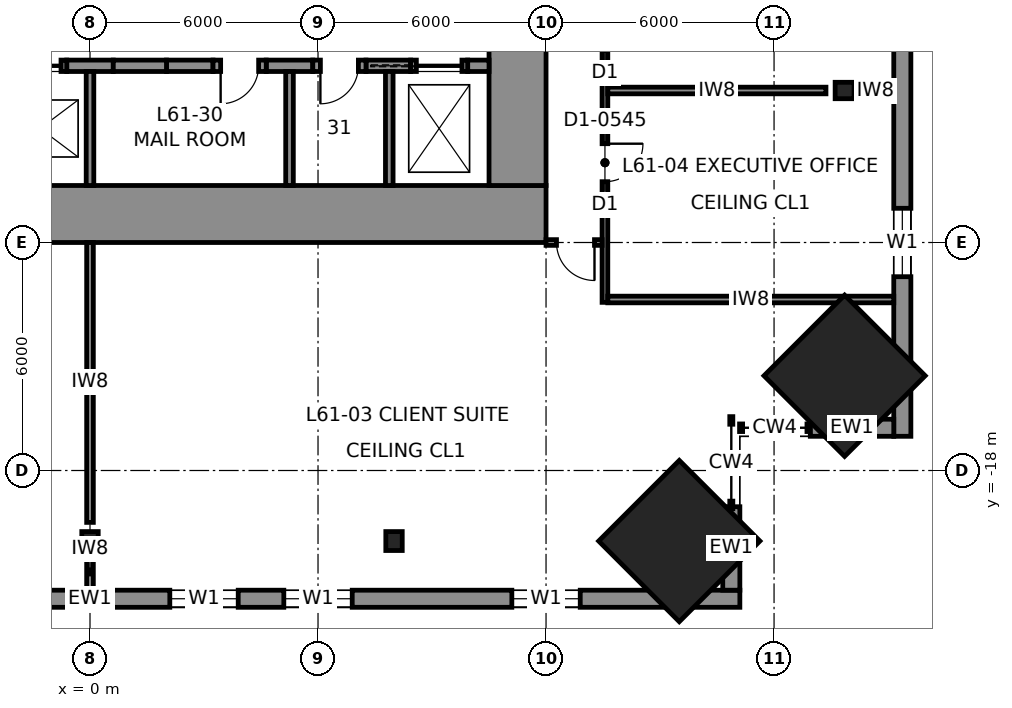
"""IFC4 building model, lengths in metres.
Left out: names, types, materials, properties, quantities, classifications, styles, units other than length and angle.
Written with IfcOpenShell. Run it as: python <this file> out.ifc"""

import sys

from ifc_helpers import new_model, si_unit, direction, frame, frame_2d, origin, origin_2d, place, context, subcontext, project, spatial, rectangle, i_section, extrude, element, fill, save


model = new_model("IFC4")
c1 = context("Model", 3, precision=1e-05, world=origin(), true_north=direction((0.0, 1.0)))
c2 = subcontext(c1, "Body", "Model", "MODEL_VIEW")
j1 = project(units=[si_unit("LENGTHUNIT", "METRE"), si_unit("PLANEANGLEUNIT", "RADIAN")], contexts=[c1])
p1 = place(None, origin())
s1 = spatial("IfcSite", under=j1, at=p1, CompositionType="ELEMENT")
p2 = place(p1, origin())
s2 = spatial("IfcBuilding", under=s1, at=p2, CompositionType="ELEMENT")
p3 = place(p2, frame((0.0, 0.0, 273.8)))
s3 = spatial("IfcBuildingStorey", under=s2, at=p3, CompositionType="ELEMENT", Elevation=273.8)
for number, where, z_axis, x_axis in (
    (1, (19.856, -15.506, 0.0), (-0.04, 0.04, 0.998), (-0.707, -0.708, 0.0)),
    (2, (15.506, -19.856, 0.0), (-0.04, 0.04, 0.998), (-0.708, -0.707, 0.0)),
):
    element("IfcColumn", number, at=place(p3, frame(where, z_axis=z_axis, x_axis=x_axis)), inside=s3, PredefinedType="COLUMN", context=c2, shape_type="SweptSolid", body=[
        extrude(rectangle(XDim=3.0, YDim=3.0, at=origin_2d()), origin(), (0.0, 0.0, 1.0), 4.007),
    ])
for number, where, z_axis, x_axis in (
    (3, (19.856, -8.0, 0.0), (-0.04, 0.0, 0.999), (0.0, -1.0, 0.0)),
    (4, (0.0, -19.856, 0.0), (0.0, 0.04, 0.999), (-1.0, 0.0, 0.0)),
    (5, (8.0, -19.856, 0.0), (0.0, 0.04, 0.999), (-1.0, 0.0, 0.0)),
):
    element("IfcColumn", number, at=place(p3, frame(where, z_axis=z_axis, x_axis=x_axis)), inside=s3, PredefinedType="COLUMN", context=c2, shape_type="SweptSolid", body=[
        extrude(i_section(OverallWidth=0.432, OverallDepth=0.498, WebThickness=0.056, FlangeThickness=0.089, at=origin_2d()), origin(), (0.0, 0.0, 1.0), 4.003),
    ])
p4 = place(p3, frame((12.0, -11.25, 0.0), z_axis=(0.0, 0.0, 1.0), x_axis=(-1.0, 0.0, 0.0)))
e6 = element("IfcWall", 6, at=p4, inside=s3, PredefinedType="SHEAR", context=c2, shape_type="SweptSolid", body=[
    extrude(rectangle(XDim=24.0, YDim=1.5, at=frame_2d((12.0, 0.0))), origin(), (0.0, 0.0, 1.0), 4.0),
])
p5 = place(p3, frame((11.25, 10.5, 0.0), z_axis=(0.0, 0.0, 1.0), x_axis=(0.0, -1.0, 0.0)))
e7 = element("IfcWall", 7, at=p5, inside=s3, PredefinedType="SHEAR", context=c2, shape_type="SweptSolid", body=[
    extrude(rectangle(XDim=21.0, YDim=1.5, at=frame_2d((10.5, 0.0))), origin(), (0.0, 0.0, 1.0), 4.0),
])
p6 = place(p5, frame((3.7, 0.0, 0.0)))
e8 = element("IfcOpeningElement", 8, at=p6, cuts=e7, PredefinedType="OPENING", context=c2, shape_type="SweptSolid", body=[
    extrude(rectangle(XDim=1.2, YDim=2.3, at=frame_2d((0.6, 1.15))), frame((0.0, 0.76, 0.0), z_axis=(0.0, -1.0, 0.0), x_axis=(1.0, 0.0, 0.0)), (0.0, 0.0, 1.0), 1.52),
])
p7 = place(p5, frame((16.1, 0.0, 0.0)))
e9 = element("IfcOpeningElement", 9, at=p7, cuts=e7, PredefinedType="OPENING", context=c2, shape_type="SweptSolid", body=[
    extrude(rectangle(XDim=1.2, YDim=2.3, at=frame_2d((0.6, 1.15))), frame((0.0, 0.76, 0.0), z_axis=(0.0, -1.0, 0.0), x_axis=(1.0, 0.0, 0.0)), (0.0, 0.0, 1.0), 1.52),
])
for number, where, z_axis, x_axis in (
    (10, (-0.613, -7.35, 0.0), (0.0, 0.0, 1.0), (1.0, 0.0, 0.0)),
    (11, (2.012, -7.35, 0.0), (0.0, 0.0, 1.0), (1.0, 0.0, 0.0)),
    (12, (4.637, -7.35, 0.0), (0.0, 0.0, 1.0), (1.0, 0.0, 0.0)),
):
    element("IfcWall", number, at=place(p3, frame(where, z_axis=z_axis, x_axis=x_axis)), inside=s3, PredefinedType="SHEAR", context=c2, shape_type="SweptSolid", body=[
        extrude(rectangle(XDim=1.225, YDim=0.3, at=frame_2d((0.613, 0.0))), origin(), (0.0, 0.0, 1.0), 4.0),
    ])
p8 = place(p3, frame((7.262, -7.35, 0.0), z_axis=(0.0, 0.0, 1.0), x_axis=(1.0, 0.0, 0.0)))
e13 = element("IfcWall", 13, at=p8, inside=s3, PredefinedType="SHEAR", context=c2, shape_type="SweptSolid", body=[
    extrude(rectangle(XDim=1.175, YDim=0.3, at=frame_2d((0.587, 0.0))), origin(), (0.0, 0.0, 1.0), 4.0),
])
p9 = place(p3, frame((9.938, -7.35, 0.0), z_axis=(0.0, 0.0, 1.0), x_axis=(1.0, 0.0, 0.0)))
e14 = element("IfcWall", 14, at=p9, inside=s3, PredefinedType="SHEAR", context=c2, shape_type="SweptSolid", body=[
    extrude(rectangle(XDim=0.562, YDim=0.3, at=frame_2d((0.281, 0.0))), origin(), (0.0, 0.0, 1.0), 4.0),
])
p10 = place(p3, frame((-2.012, -7.35, 0.0), z_axis=(0.0, 0.0, 1.0), x_axis=(1.0, 0.0, 0.0)))
e15 = element("IfcWall", 15, at=p10, inside=s3, PredefinedType="PARTITIONING", context=c2, shape_type="SweptSolid", body=[
    extrude(rectangle(XDim=1.4, YDim=0.3, at=frame_2d((0.7, 0.0))), origin(), (0.0, 0.0, 1.0), 4.0),
])
p11 = place(p10, frame((0.15, 0.0, 0.0)))
e16 = element("IfcOpeningElement", 16, at=p11, cuts=e15, PredefinedType="OPENING", context=c2, shape_type="SweptSolid", body=[
    extrude(rectangle(XDim=1.1, YDim=2.3, at=frame_2d((0.55, 1.15))), frame((0.0, 0.16, 0.0), z_axis=(0.0, -1.0, 0.0), x_axis=(1.0, 0.0, 0.0)), (0.0, 0.0, 1.0), 0.32),
])
p12 = place(p3, frame((0.613, -7.35, 0.0), z_axis=(0.0, 0.0, 1.0), x_axis=(1.0, 0.0, 0.0)))
e17 = element("IfcWall", 17, at=p12, inside=s3, PredefinedType="PARTITIONING", context=c2, shape_type="SweptSolid", body=[
    extrude(rectangle(XDim=1.4, YDim=0.3, at=frame_2d((0.7, 0.0))), origin(), (0.0, 0.0, 1.0), 4.0),
])
p13 = place(p3, frame((3.238, -7.35, 0.0), z_axis=(0.0, 0.0, 1.0), x_axis=(1.0, 0.0, 0.0)))
e18 = element("IfcWall", 18, at=p13, inside=s3, PredefinedType="PARTITIONING", context=c2, shape_type="SweptSolid", body=[
    extrude(rectangle(XDim=1.4, YDim=0.3, at=frame_2d((0.7, 0.0))), origin(), (0.0, 0.0, 1.0), 4.0),
])
p14 = place(p13, frame((0.2, 0.0, 0.0)))
e19 = element("IfcOpeningElement", 19, at=p14, cuts=e18, PredefinedType="OPENING", context=c2, shape_type="SweptSolid", body=[
    extrude(rectangle(XDim=1.0, YDim=2.3, at=frame_2d((0.5, 1.15))), frame((0.0, 0.16, 0.0), z_axis=(0.0, -1.0, 0.0), x_axis=(1.0, 0.0, 0.0)), (0.0, 0.0, 1.0), 0.32),
])
p15 = place(p3, frame((5.863, -7.35, 0.0), z_axis=(0.0, 0.0, 1.0), x_axis=(1.0, 0.0, 0.0)))
e20 = element("IfcWall", 20, at=p15, inside=s3, PredefinedType="PARTITIONING", context=c2, shape_type="SweptSolid", body=[
    extrude(rectangle(XDim=1.4, YDim=0.3, at=frame_2d((0.7, 0.0))), origin(), (0.0, 0.0, 1.0), 4.0),
])
p16 = place(p15, frame((0.2, 0.0, 0.0)))
e21 = element("IfcOpeningElement", 21, at=p16, cuts=e20, PredefinedType="OPENING", context=c2, shape_type="SweptSolid", body=[
    extrude(rectangle(XDim=1.0, YDim=2.3, at=frame_2d((0.5, 1.15))), frame((0.0, 0.16, 0.0), z_axis=(0.0, -1.0, 0.0), x_axis=(1.0, 0.0, 0.0)), (0.0, 0.0, 1.0), 0.32),
])
p17 = place(p3, frame((8.438, -7.35, 0.0), z_axis=(0.0, 0.0, 1.0), x_axis=(1.0, 0.0, 0.0)))
e22 = element("IfcWall", 22, at=p17, inside=s3, PredefinedType="PARTITIONING", context=c2, shape_type="SweptSolid", body=[
    extrude(rectangle(XDim=1.5, YDim=0.3, at=frame_2d((0.75, 0.0))), origin(), (0.0, 0.0, 1.0), 4.0),
])
p18 = place(p17, frame((0.15, 0.0, 0.0)))
e23 = element("IfcOpeningElement", 23, at=p18, cuts=e22, PredefinedType="OPENING", context=c2, shape_type="SweptSolid", body=[
    extrude(rectangle(XDim=1.2, YDim=2.3, at=frame_2d((0.6, 1.15))), frame((0.0, 0.16, 0.0), z_axis=(0.0, -1.0, 0.0), x_axis=(1.0, 0.0, 0.0)), (0.0, 0.0, 1.0), 0.32),
])
for number, where, z_axis, x_axis in (
    (24, (0.0, -10.5, 0.0), (0.0, 0.0, 1.0), (0.0, 1.0, 0.0)),
    (25, (5.25, -10.5, 0.0), (0.0, 0.0, 1.0), (0.0, 1.0, 0.0)),
    (26, (7.875, -10.5, 0.0), (0.0, 0.0, 1.0), (0.0, 1.0, 0.0)),
):
    element("IfcWall", number, at=place(p3, frame(where, z_axis=z_axis, x_axis=x_axis)), inside=s3, PredefinedType="PARTITIONING", context=c2, shape_type="SweptSolid", body=[
        extrude(rectangle(XDim=3.0, YDim=0.2, at=frame_2d((1.5, 0.0))), origin(), (0.0, 0.0, 1.0), 4.0),
    ])
p19 = place(p3, frame((21.375, -17.1, 0.0), z_axis=(0.0, 0.0, 1.0), x_axis=(0.0, 1.0, 0.0)))
e27 = element("IfcWall", 27, at=p19, inside=s3, PredefinedType="SOLIDWALL", context=c2, shape_type="SweptSolid", body=[
    extrude(rectangle(XDim=34.2, YDim=0.45, at=frame_2d((17.1, 0.0))), origin(), (0.0, 0.0, 1.0), 3.83),
])
p20 = place(p19, frame((4.2, 0.0, 0.7)))
e28 = element("IfcOpeningElement", 28, at=p20, cuts=e27, PredefinedType="OPENING", context=c2, shape_type="SweptSolid", body=[
    extrude(rectangle(XDim=1.8, YDim=2.6, at=frame_2d((0.9, 1.3))), frame((0.0, 0.235, 0.0), z_axis=(0.0, -1.0, 0.0), x_axis=(1.0, 0.0, 0.0)), (0.0, 0.0, 1.0), 0.47),
])
p21 = place(p19, frame((10.2, 0.0, 0.7)))
e29 = element("IfcOpeningElement", 29, at=p21, cuts=e27, PredefinedType="OPENING", context=c2, shape_type="SweptSolid", body=[
    extrude(rectangle(XDim=1.8, YDim=2.6, at=frame_2d((0.9, 1.3))), frame((0.0, 0.235, 0.0), z_axis=(0.0, -1.0, 0.0), x_axis=(1.0, 0.0, 0.0)), (0.0, 0.0, 1.0), 0.47),
])
p22 = place(p19, frame((13.2, 0.0, 0.7)))
e30 = element("IfcOpeningElement", 30, at=p22, cuts=e27, PredefinedType="OPENING", context=c2, shape_type="SweptSolid", body=[
    extrude(rectangle(XDim=1.8, YDim=2.6, at=frame_2d((0.9, 1.3))), frame((0.0, 0.235, 0.0), z_axis=(0.0, -1.0, 0.0), x_axis=(1.0, 0.0, 0.0)), (0.0, 0.0, 1.0), 0.47),
])
p23 = place(p19, frame((19.2, 0.0, 0.7)))
e31 = element("IfcOpeningElement", 31, at=p23, cuts=e27, PredefinedType="OPENING", context=c2, shape_type="SweptSolid", body=[
    extrude(rectangle(XDim=1.8, YDim=2.6, at=frame_2d((0.9, 1.3))), frame((0.0, 0.235, 0.0), z_axis=(0.0, -1.0, 0.0), x_axis=(1.0, 0.0, 0.0)), (0.0, 0.0, 1.0), 0.47),
])
p24 = place(p19, frame((22.2, 0.0, 0.7)))
e32 = element("IfcOpeningElement", 32, at=p24, cuts=e27, PredefinedType="OPENING", context=c2, shape_type="SweptSolid", body=[
    extrude(rectangle(XDim=1.8, YDim=2.6, at=frame_2d((0.9, 1.3))), frame((0.0, 0.235, 0.0), z_axis=(0.0, -1.0, 0.0), x_axis=(1.0, 0.0, 0.0)), (0.0, 0.0, 1.0), 0.47),
])
p25 = place(p19, frame((28.2, 0.0, 0.7)))
e33 = element("IfcOpeningElement", 33, at=p25, cuts=e27, PredefinedType="OPENING", context=c2, shape_type="SweptSolid", body=[
    extrude(rectangle(XDim=1.8, YDim=2.6, at=frame_2d((0.9, 1.3))), frame((0.0, 0.235, 0.0), z_axis=(0.0, -1.0, 0.0), x_axis=(1.0, 0.0, 0.0)), (0.0, 0.0, 1.0), 0.47),
])
p26 = place(p3, frame((-17.1, -21.375, 0.0), z_axis=(0.0, 0.0, 1.0), x_axis=(1.0, 0.0, 0.0)))
e34 = element("IfcWall", 34, at=p26, inside=s3, PredefinedType="SOLIDWALL", context=c2, shape_type="SweptSolid", body=[
    extrude(rectangle(XDim=34.2, YDim=0.45, at=frame_2d((17.1, 0.0))), origin(), (0.0, 0.0, 1.0), 3.83),
])
p27 = place(p26, frame((4.2, 0.0, 0.7)))
e35 = element("IfcOpeningElement", 35, at=p27, cuts=e34, PredefinedType="OPENING", context=c2, shape_type="SweptSolid", body=[
    extrude(rectangle(XDim=1.8, YDim=2.6, at=frame_2d((0.9, 1.3))), frame((0.0, 0.235, 0.0), z_axis=(0.0, -1.0, 0.0), x_axis=(1.0, 0.0, 0.0)), (0.0, 0.0, 1.0), 0.47),
])
p28 = place(p26, frame((10.2, 0.0, 0.7)))
e36 = element("IfcOpeningElement", 36, at=p28, cuts=e34, PredefinedType="OPENING", context=c2, shape_type="SweptSolid", body=[
    extrude(rectangle(XDim=1.8, YDim=2.6, at=frame_2d((0.9, 1.3))), frame((0.0, 0.235, 0.0), z_axis=(0.0, -1.0, 0.0), x_axis=(1.0, 0.0, 0.0)), (0.0, 0.0, 1.0), 0.47),
])
p29 = place(p26, frame((13.2, 0.0, 0.7)))
e37 = element("IfcOpeningElement", 37, at=p29, cuts=e34, PredefinedType="OPENING", context=c2, shape_type="SweptSolid", body=[
    extrude(rectangle(XDim=1.8, YDim=2.6, at=frame_2d((0.9, 1.3))), frame((0.0, 0.235, 0.0), z_axis=(0.0, -1.0, 0.0), x_axis=(1.0, 0.0, 0.0)), (0.0, 0.0, 1.0), 0.47),
])
p30 = place(p26, frame((19.2, 0.0, 0.7)))
e38 = element("IfcOpeningElement", 38, at=p30, cuts=e34, PredefinedType="OPENING", context=c2, shape_type="SweptSolid", body=[
    extrude(rectangle(XDim=1.8, YDim=2.6, at=frame_2d((0.9, 1.3))), frame((0.0, 0.235, 0.0), z_axis=(0.0, -1.0, 0.0), x_axis=(1.0, 0.0, 0.0)), (0.0, 0.0, 1.0), 0.47),
])
p31 = place(p26, frame((22.2, 0.0, 0.7)))
e39 = element("IfcOpeningElement", 39, at=p31, cuts=e34, PredefinedType="OPENING", context=c2, shape_type="SweptSolid", body=[
    extrude(rectangle(XDim=1.8, YDim=2.6, at=frame_2d((0.9, 1.3))), frame((0.0, 0.235, 0.0), z_axis=(0.0, -1.0, 0.0), x_axis=(1.0, 0.0, 0.0)), (0.0, 0.0, 1.0), 0.47),
])
p32 = place(p26, frame((28.2, 0.0, 0.7)))
e40 = element("IfcOpeningElement", 40, at=p32, cuts=e34, PredefinedType="OPENING", context=c2, shape_type="SweptSolid", body=[
    extrude(rectangle(XDim=1.8, YDim=2.6, at=frame_2d((0.9, 1.3))), frame((0.0, 0.235, 0.0), z_axis=(0.0, -1.0, 0.0), x_axis=(1.0, 0.0, 0.0)), (0.0, 0.0, 1.0), 0.47),
])
for number, where, z_axis, x_axis in (
    (41, (16.875, -18.954, 0.0), (0.0, 0.0, 1.0), (0.0, -1.0, 0.0)),
    (42, (18.954, -16.875, 0.0), (0.0, 0.0, 1.0), (1.0, 0.0, 0.0)),
):
    element("IfcWall", number, at=place(p3, frame(where, z_axis=z_axis, x_axis=x_axis)), inside=s3, PredefinedType="SOLIDWALL", context=c2, shape_type="SweptSolid", body=[
        extrude(rectangle(XDim=2.196, YDim=0.45, at=frame_2d((1.098, 0.0))), origin(), (0.0, 0.0, 1.0), 3.83),
    ])
p33 = place(p3, frame((13.55, -13.575, 0.0), z_axis=(0.0, 0.0, 1.0), x_axis=(0.0, 1.0, 0.0)))
e43 = element("IfcWall", 43, at=p33, inside=s3, PredefinedType="PARTITIONING", context=c2, shape_type="SweptSolid", body=[
    extrude(rectangle(XDim=27.15, YDim=0.15, at=frame_2d((13.575, 0.0))), origin(), (0.0, 0.0, 1.0), 3.83),
])
p34 = place(p33, frame((3.175, 0.0, 0.0)))
e44 = element("IfcOpeningElement", 44, at=p34, cuts=e43, PredefinedType="OPENING", context=c2, shape_type="SweptSolid", body=[
    extrude(rectangle(XDim=1.0, YDim=2.3, at=frame_2d((0.5, 1.15))), frame((0.0, 0.085, 0.0), z_axis=(0.0, -1.0, 0.0), x_axis=(1.0, 0.0, 0.0)), (0.0, 0.0, 1.0), 0.17),
])
p35 = place(p33, frame((6.625, 0.0, 0.0)))
e45 = element("IfcOpeningElement", 45, at=p35, cuts=e43, PredefinedType="OPENING", context=c2, shape_type="SweptSolid", body=[
    extrude(rectangle(XDim=1.0, YDim=2.3, at=frame_2d((0.5, 1.15))), frame((0.0, 0.085, 0.0), z_axis=(0.0, -1.0, 0.0), x_axis=(1.0, 0.0, 0.0)), (0.0, 0.0, 1.0), 0.17),
])
p36 = place(p33, frame((17.075, 0.0, 0.0)))
e46 = element("IfcOpeningElement", 46, at=p36, cuts=e43, PredefinedType="OPENING", context=c2, shape_type="SweptSolid", body=[
    extrude(rectangle(XDim=1.0, YDim=2.3, at=frame_2d((0.5, 1.15))), frame((0.0, 0.085, 0.0), z_axis=(0.0, -1.0, 0.0), x_axis=(1.0, 0.0, 0.0)), (0.0, 0.0, 1.0), 0.17),
])
p37 = place(p33, frame((22.975, 0.0, 0.0)))
e47 = element("IfcOpeningElement", 47, at=p37, cuts=e43, PredefinedType="OPENING", context=c2, shape_type="SweptSolid", body=[
    extrude(rectangle(XDim=1.0, YDim=2.3, at=frame_2d((0.5, 1.15))), frame((0.0, 0.085, 0.0), z_axis=(0.0, -1.0, 0.0), x_axis=(1.0, 0.0, 0.0)), (0.0, 0.0, 1.0), 0.17),
])
p38 = place(p33, frame((9.825, 0.0, 0.0)))
e48 = element("IfcOpeningElement", 48, at=p38, cuts=e43, PredefinedType="OPENING", context=c2, shape_type="SweptSolid", body=[
    extrude(rectangle(XDim=1.0, YDim=2.3, at=frame_2d((0.5, 1.15))), frame((0.0, 0.085, 0.0), z_axis=(0.0, -1.0, 0.0), x_axis=(1.0, 0.0, 0.0)), (0.0, 0.0, 1.0), 0.17),
])
p39 = place(p3, frame((13.475, -12.0, 0.0), z_axis=(0.0, 0.0, 1.0), x_axis=(-1.0, 0.0, 0.0)))
e49 = element("IfcWall", 49, at=p39, inside=s3, PredefinedType="PARTITIONING", context=c2, shape_type="SweptSolid", body=[
    extrude(rectangle(XDim=1.475, YDim=0.15, at=frame_2d((0.738, 0.0))), origin(), (0.0, 0.0, 1.0), 3.83),
])
p40 = place(p39, frame((0.2, 0.0, 0.0)))
e50 = element("IfcOpeningElement", 50, at=p40, cuts=e49, PredefinedType="OPENING", context=c2, shape_type="SweptSolid", body=[
    extrude(rectangle(XDim=1.0, YDim=2.3, at=frame_2d((0.5, 1.15))), frame((0.0, 0.085, 0.0), z_axis=(0.0, -1.0, 0.0), x_axis=(1.0, 0.0, 0.0)), (0.0, 0.0, 1.0), 0.17),
])
p41 = place(p3, frame((21.15, -13.5, 0.0), z_axis=(0.0, 0.0, 1.0), x_axis=(-1.0, 0.0, 0.0)))
e51 = element("IfcWall", 51, at=p41, inside=s3, PredefinedType="PARTITIONING", context=c2, shape_type="SweptSolid", body=[
    extrude(rectangle(XDim=7.525, YDim=0.175, at=frame_2d((3.762, 0.0))), origin(), (0.0, 0.0, 1.0), 3.83),
])
p42 = place(p3, frame((0.0, -12.0, 0.0), z_axis=(0.0, 0.0, 1.0), x_axis=(0.0, -1.0, 0.0)))
e52 = element("IfcWall", 52, at=p42, inside=s3, PredefinedType="PARTITIONING", context=c2, shape_type="SweptSolid", body=[
    extrude(rectangle(XDim=7.365, YDim=0.175, at=frame_2d((3.683, 0.0))), origin(), (0.0, 0.0, 1.0), 3.24),
])
p43 = place(p3, frame((0.0, -20.186, 0.0), z_axis=(0.0, 0.0, 1.0), x_axis=(0.0, -1.0, 0.0)))
e53 = element("IfcWall", 53, at=p43, inside=s3, PredefinedType="PARTITIONING", context=c2, shape_type="SweptSolid", body=[
    extrude(rectangle(XDim=0.964, YDim=0.175, at=frame_2d((0.482, 0.0))), origin(), (0.0, 0.0, 1.0), 3.83),
])
p44 = place(p3, frame((13.625, -8.0, 0.0), z_axis=(0.0, 0.0, 1.0), x_axis=(1.0, 0.0, 0.0)))
e54 = element("IfcWall", 54, at=p44, inside=s3, PredefinedType="PARTITIONING", context=c2, shape_type="SweptSolid", body=[
    extrude(rectangle(XDim=5.74, YDim=0.175, at=frame_2d((2.87, 0.0))), origin(), (0.0, 0.0, 1.0), 3.24),
])
p45 = place(p3, frame((20.186, -8.0, 0.0), z_axis=(0.0, 0.0, 1.0), x_axis=(1.0, 0.0, 0.0)))
e55 = element("IfcWall", 55, at=p45, inside=s3, PredefinedType="PARTITIONING", context=c2, shape_type="SweptSolid", body=[
    extrude(rectangle(XDim=0.964, YDim=0.175, at=frame_2d((0.482, 0.0))), origin(), (0.0, 0.0, 1.0), 3.83),
])
p46 = place(p20, origin())
e56 = element("IfcWindow", 56, at=p46, inside=s3, PartitioningType="SINGLE_PANEL", PredefinedType="WINDOW", context=c2, shape_type="SweptSolid", body=[
    extrude(rectangle(XDim=1.8, YDim=2.6, at=frame_2d((0.9, 1.3))), frame((0.0, 0.03, 0.0), z_axis=(0.0, -1.0, 0.0), x_axis=(1.0, 0.0, 0.0)), (0.0, 0.0, 1.0), 0.06),
])
fill(e28, e56)
p47 = place(p30, origin())
e57 = element("IfcWindow", 57, at=p47, inside=s3, PartitioningType="SINGLE_PANEL", PredefinedType="WINDOW", context=c2, shape_type="SweptSolid", body=[
    extrude(rectangle(XDim=1.8, YDim=2.6, at=frame_2d((0.9, 1.3))), frame((0.0, 0.03, 0.0), z_axis=(0.0, -1.0, 0.0), x_axis=(1.0, 0.0, 0.0)), (0.0, 0.0, 1.0), 0.06),
])
fill(e38, e57)
p48 = place(p31, origin())
e58 = element("IfcWindow", 58, at=p48, inside=s3, PartitioningType="SINGLE_PANEL", PredefinedType="WINDOW", context=c2, shape_type="SweptSolid", body=[
    extrude(rectangle(XDim=1.8, YDim=2.6, at=frame_2d((0.9, 1.3))), frame((0.0, 0.03, 0.0), z_axis=(0.0, -1.0, 0.0), x_axis=(1.0, 0.0, 0.0)), (0.0, 0.0, 1.0), 0.06),
])
fill(e39, e58)
p49 = place(p32, origin())
e59 = element("IfcWindow", 59, at=p49, inside=s3, PartitioningType="SINGLE_PANEL", PredefinedType="WINDOW", context=c2, shape_type="SweptSolid", body=[
    extrude(rectangle(XDim=1.8, YDim=2.6, at=frame_2d((0.9, 1.3))), frame((0.0, 0.03, 0.0), z_axis=(0.0, -1.0, 0.0), x_axis=(1.0, 0.0, 0.0)), (0.0, 0.0, 1.0), 0.06),
])
fill(e40, e59)
p50 = place(p40, origin())
e60 = element("IfcDoor", 60, at=p50, inside=s3, OperationType="SINGLE_SWING_LEFT", PredefinedType="DOOR", context=c2, shape_type="SweptSolid", body=[
    extrude(rectangle(XDim=1.0, YDim=2.3, at=frame_2d((0.5, 1.15))), frame((0.0, 0.025, 0.0), z_axis=(0.0, -1.0, 0.0), x_axis=(1.0, 0.0, 0.0)), (0.0, 0.0, 1.0), 0.05),
])
fill(e50, e60)
p51 = place(p34, frame((1.0, 0.0, 0.0), z_axis=(0.0, 0.0, 1.0), x_axis=(-1.0, 0.0, 0.0)))
e61 = element("IfcDoor", 61, at=p51, inside=s3, OperationType="SINGLE_SWING_LEFT", PredefinedType="DOOR", context=c2, shape_type="SweptSolid", body=[
    extrude(rectangle(XDim=1.0, YDim=2.3, at=frame_2d((0.5, 1.15))), frame((0.0, 0.025, 0.0), z_axis=(0.0, -1.0, 0.0), x_axis=(1.0, 0.0, 0.0)), (0.0, 0.0, 1.0), 0.05),
])
fill(e44, e61)
p52 = place(p14, frame((1.0, 0.0, 0.0), z_axis=(0.0, 0.0, 1.0), x_axis=(-1.0, 0.0, 0.0)))
e62 = element("IfcDoor", 62, at=p52, inside=s3, OperationType="SINGLE_SWING_RIGHT", PredefinedType="DOOR", context=c2, shape_type="SweptSolid", body=[
    extrude(rectangle(XDim=1.0, YDim=2.3, at=frame_2d((0.5, 1.15))), frame((0.0, 0.025, 0.0), z_axis=(0.0, -1.0, 0.0), x_axis=(1.0, 0.0, 0.0)), (0.0, 0.0, 1.0), 0.05),
])
fill(e19, e62)
p53 = place(p16, frame((1.0, 0.0, 0.0), z_axis=(0.0, 0.0, 1.0), x_axis=(-1.0, 0.0, 0.0)))
e63 = element("IfcDoor", 63, at=p53, inside=s3, OperationType="SINGLE_SWING_RIGHT", PredefinedType="DOOR", context=c2, shape_type="SweptSolid", body=[
    extrude(rectangle(XDim=1.0, YDim=2.3, at=frame_2d((0.5, 1.15))), frame((0.0, 0.025, 0.0), z_axis=(0.0, -1.0, 0.0), x_axis=(1.0, 0.0, 0.0)), (0.0, 0.0, 1.0), 0.05),
])
fill(e21, e63)
p54 = place(p18, origin())
e64 = element("IfcDoor", 64, at=p54, inside=s3, OperationType="SLIDING_TO_LEFT", PredefinedType="DOOR", context=c2, shape_type="SweptSolid", body=[
    extrude(rectangle(XDim=1.2, YDim=2.3, at=frame_2d((0.6, 1.15))), frame((0.0, 0.025, 0.0), z_axis=(0.0, -1.0, 0.0), x_axis=(1.0, 0.0, 0.0)), (0.0, 0.0, 1.0), 0.05),
])
fill(e23, e64)
p55 = place(p11, origin())
e65 = element("IfcDoor", 65, at=p55, inside=s3, OperationType="SLIDING_TO_LEFT", PredefinedType="DOOR", context=c2, shape_type="SweptSolid", body=[
    extrude(rectangle(XDim=1.1, YDim=2.3, at=frame_2d((0.55, 1.15))), frame((0.0, 0.025, 0.0), z_axis=(0.0, -1.0, 0.0), x_axis=(1.0, 0.0, 0.0)), (0.0, 0.0, 1.0), 0.05),
])
fill(e16, e65)
save(model, sys.argv[1])
